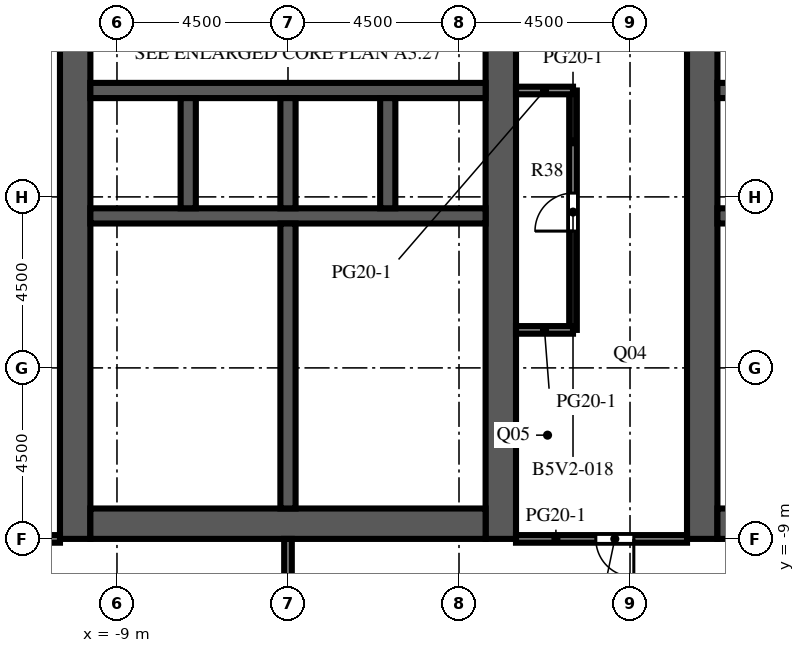
"""IFC4 building model, lengths in metres.
Left out: names, types, materials, properties, quantities, classifications, styles, units other than length and angle.
Written with IfcOpenShell. Run it as: python <this file> out.ifc"""

import sys

from ifc_helpers import new_model, si_unit, direction, frame, frame_2d, origin, place, context, subcontext, project, spatial, rectangle, extrude, element, fill, save


model = new_model("IFC4")
c1 = context("Model", 3, precision=1e-05, world=origin(), true_north=direction((0.0, 1.0)))
c2 = subcontext(c1, "Body", "Model", "MODEL_VIEW")
j1 = project(units=[si_unit("LENGTHUNIT", "METRE"), si_unit("PLANEANGLEUNIT", "RADIAN")], contexts=[c1])
p1 = place(None, origin())
s1 = spatial("IfcSite", under=j1, at=p1, CompositionType="ELEMENT")
p2 = place(p1, origin())
s2 = spatial("IfcBuilding", under=s1, at=p2, CompositionType="ELEMENT")
p3 = place(p2, frame((0.0, 0.0, 177.3)))
s3 = spatial("IfcBuildingStorey", under=s2, at=p3, CompositionType="ELEMENT", Elevation=177.3)
p4 = place(p3, frame((-10.1, -9.0, 0.0), z_axis=(0.0, 0.0, 1.0), x_axis=(0.0, 1.0, 0.0)))
e1 = element("IfcWall", 1, at=p4, inside=s3, PredefinedType="SHEAR", context=c2, shape_type="SweptSolid", body=[
    extrude(rectangle(XDim=27.5, YDim=0.8, at=frame_2d((13.75, 0.0))), origin(), (0.0, 0.0, 1.0), 4.1),
])
p5 = place(p4, frame((12.55, 0.0, 0.0)))
e2 = element("IfcOpeningElement", 2, at=p5, cuts=e1, PredefinedType="OPENING", context=c2, shape_type="SweptSolid", body=[
    extrude(rectangle(XDim=2.4, YDim=2.4, at=frame_2d((1.2, 1.2))), frame((0.0, 0.41, 0.0), z_axis=(0.0, -1.0, 0.0), x_axis=(1.0, 0.0, 0.0)), (0.0, 0.0, 1.0), 0.82),
])
p6 = place(p4, frame((6.825, 0.0, 0.0)))
e3 = element("IfcOpeningElement", 3, at=p6, cuts=e1, PredefinedType="OPENING", context=c2, shape_type="SweptSolid", body=[
    extrude(rectangle(XDim=1.2, YDim=2.1, at=frame_2d((0.6, 1.05))), frame((0.0, 0.41, 0.0), z_axis=(0.0, -1.0, 0.0), x_axis=(1.0, 0.0, 0.0)), (0.0, 0.0, 1.0), 0.82),
])
p7 = place(p4, frame((19.475, 0.0, 0.0)))
e4 = element("IfcOpeningElement", 4, at=p7, cuts=e1, PredefinedType="OPENING", context=c2, shape_type="SweptSolid", body=[
    extrude(rectangle(XDim=1.2, YDim=2.1, at=frame_2d((0.6, 1.05))), frame((0.0, 0.41, 0.0), z_axis=(0.0, -1.0, 0.0), x_axis=(1.0, 0.0, 0.0)), (0.0, 0.0, 1.0), 0.82),
])
p8 = place(p3, frame((1.1, -9.0, 0.0), z_axis=(0.0, 0.0, 1.0), x_axis=(0.0, 1.0, 0.0)))
e5 = element("IfcWall", 5, at=p8, inside=s3, PredefinedType="SHEAR", context=c2, shape_type="SweptSolid", body=[
    extrude(rectangle(XDim=27.5, YDim=0.8, at=frame_2d((13.75, 0.0))), origin(), (0.0, 0.0, 1.0), 4.1),
])
p9 = place(p8, frame((12.55, 0.0, 0.0)))
e6 = element("IfcOpeningElement", 6, at=p9, cuts=e5, PredefinedType="OPENING", context=c2, shape_type="SweptSolid", body=[
    extrude(rectangle(XDim=2.4, YDim=2.4, at=frame_2d((1.2, 1.2))), frame((0.0, 0.41, 0.0), z_axis=(0.0, -1.0, 0.0), x_axis=(1.0, 0.0, 0.0)), (0.0, 0.0, 1.0), 0.82),
])
p10 = place(p8, frame((3.85, 0.0, 0.0)))
e7 = element("IfcOpeningElement", 7, at=p10, cuts=e5, PredefinedType="OPENING", context=c2, shape_type="SweptSolid", body=[
    extrude(rectangle(XDim=0.95, YDim=2.1, at=frame_2d((0.475, 1.05))), frame((0.0, 0.41, 0.0), z_axis=(0.0, -1.0, 0.0), x_axis=(1.0, 0.0, 0.0)), (0.0, 0.0, 1.0), 0.82),
])
p11 = place(p8, frame((23.475, 0.0, 0.0)))
e8 = element("IfcOpeningElement", 8, at=p11, cuts=e5, PredefinedType="OPENING", context=c2, shape_type="SweptSolid", body=[
    extrude(rectangle(XDim=1.2, YDim=2.1, at=frame_2d((0.6, 1.05))), frame((0.0, 0.41, 0.0), z_axis=(0.0, -1.0, 0.0), x_axis=(1.0, 0.0, 0.0)), (0.0, 0.0, 1.0), 0.82),
])
p12 = place(p3, frame((-9.7, -8.6, 0.0), z_axis=(0.0, 0.0, 1.0), x_axis=(1.0, 0.0, 0.0)))
e9 = element("IfcWall", 9, at=p12, inside=s3, PredefinedType="SHEAR", context=c2, shape_type="SweptSolid", body=[
    extrude(rectangle(XDim=10.4, YDim=0.8, at=frame_2d((5.2, 0.0))), origin(), (0.0, 0.0, 1.0), 4.1),
])
p13 = place(p3, frame((-9.7, -0.5, 0.0), z_axis=(0.0, 0.0, 1.0), x_axis=(1.0, 0.0, 0.0)))
e10 = element("IfcWall", 10, at=p13, inside=s3, PredefinedType="SHEAR", context=c2, shape_type="SweptSolid", body=[
    extrude(rectangle(XDim=10.4, YDim=0.4, at=frame_2d((5.2, 0.0))), origin(), (0.0, 0.0, 1.0), 4.1),
])
p14 = place(p3, frame((-9.7, 2.8, 0.0), z_axis=(0.0, 0.0, 1.0), x_axis=(1.0, 0.0, 0.0)))
e11 = element("IfcWall", 11, at=p14, inside=s3, PredefinedType="SHEAR", context=c2, shape_type="SweptSolid", body=[
    extrude(rectangle(XDim=10.4, YDim=0.4, at=frame_2d((5.2, 0.0))), origin(), (0.0, 0.0, 1.0), 4.1),
])
p15 = place(p14, frame((0.738, 0.0, 0.0)))
e12 = element("IfcOpeningElement", 12, at=p15, cuts=e11, PredefinedType="OPENING", context=c2, shape_type="SweptSolid", body=[
    extrude(rectangle(XDim=1.1, YDim=2.1, at=frame_2d((0.55, 1.05))), frame((0.0, 0.21, 0.0), z_axis=(0.0, -1.0, 0.0), x_axis=(1.0, 0.0, 0.0)), (0.0, 0.0, 1.0), 0.42),
])
p16 = place(p14, frame((3.337, 0.0, 0.0)))
e13 = element("IfcOpeningElement", 13, at=p16, cuts=e11, PredefinedType="OPENING", context=c2, shape_type="SweptSolid", body=[
    extrude(rectangle(XDim=1.1, YDim=2.1, at=frame_2d((0.55, 1.05))), frame((0.0, 0.21, 0.0), z_axis=(0.0, -1.0, 0.0), x_axis=(1.0, 0.0, 0.0)), (0.0, 0.0, 1.0), 0.42),
])
p17 = place(p14, frame((6.012, 0.0, 0.0)))
e14 = element("IfcOpeningElement", 14, at=p17, cuts=e11, PredefinedType="OPENING", context=c2, shape_type="SweptSolid", body=[
    extrude(rectangle(XDim=1.0, YDim=2.1, at=frame_2d((0.5, 1.05))), frame((0.0, 0.21, 0.0), z_axis=(0.0, -1.0, 0.0), x_axis=(1.0, 0.0, 0.0)), (0.0, 0.0, 1.0), 0.42),
])
p18 = place(p14, frame((8.613, 0.0, 0.0)))
e15 = element("IfcOpeningElement", 15, at=p18, cuts=e11, PredefinedType="OPENING", context=c2, shape_type="SweptSolid", body=[
    extrude(rectangle(XDim=1.0, YDim=2.1, at=frame_2d((0.5, 1.05))), frame((0.0, 0.21, 0.0), z_axis=(0.0, -1.0, 0.0), x_axis=(1.0, 0.0, 0.0)), (0.0, 0.0, 1.0), 0.42),
])
for number, where, z_axis, x_axis in (
    (16, (-7.125, -0.3, 0.0), (0.0, 0.0, 1.0), (0.0, 1.0, 0.0)),
    (17, (-4.5, -0.3, 0.0), (0.0, 0.0, 1.0), (0.0, 1.0, 0.0)),
    (18, (-1.875, -0.3, 0.0), (0.0, 0.0, 1.0), (0.0, 1.0, 0.0)),
):
    element("IfcWall", number, at=place(p3, frame(where, z_axis=z_axis, x_axis=x_axis)), inside=s3, PredefinedType="SHEAR", context=c2, shape_type="SweptSolid", body=[
        extrude(rectangle(XDim=2.9, YDim=0.4, at=frame_2d((1.45, 0.0))), origin(), (0.0, 0.0, 1.0), 4.1),
    ])
p19 = place(p3, frame((-4.5, -8.2, 0.0), z_axis=(0.0, 0.0, 1.0), x_axis=(0.0, 1.0, 0.0)))
e19 = element("IfcWall", 19, at=p19, inside=s3, PredefinedType="SHEAR", context=c2, shape_type="SweptSolid", body=[
    extrude(rectangle(XDim=7.5, YDim=0.4, at=frame_2d((3.75, 0.0))), origin(), (0.0, 0.0, 1.0), 4.1),
])
p20 = place(p3, frame((6.4, -9.0, 0.0), z_axis=(0.0, 0.0, 1.0), x_axis=(0.0, 1.0, 0.0)))
e20 = element("IfcWall", 20, at=p20, inside=s3, PredefinedType="SHEAR", context=c2, shape_type="SweptSolid", body=[
    extrude(rectangle(XDim=27.5, YDim=0.8, at=frame_2d((13.75, 0.0))), origin(), (0.0, 0.0, 1.0), 4.1),
])
p21 = place(p20, frame((12.55, 0.0, 0.0)))
e21 = element("IfcOpeningElement", 21, at=p21, cuts=e20, PredefinedType="OPENING", context=c2, shape_type="SweptSolid", body=[
    extrude(rectangle(XDim=2.4, YDim=2.4, at=frame_2d((1.2, 1.2))), frame((0.0, 0.41, 0.0), z_axis=(0.0, -1.0, 0.0), x_axis=(1.0, 0.0, 0.0)), (0.0, 0.0, 1.0), 0.82),
])
p22 = place(p20, frame((3.85, 0.0, 0.0)))
e22 = element("IfcOpeningElement", 22, at=p22, cuts=e20, PredefinedType="OPENING", context=c2, shape_type="SweptSolid", body=[
    extrude(rectangle(XDim=0.95, YDim=2.1, at=frame_2d((0.475, 1.05))), frame((0.0, 0.41, 0.0), z_axis=(0.0, -1.0, 0.0), x_axis=(1.0, 0.0, 0.0)), (0.0, 0.0, 1.0), 0.82),
])
p23 = place(p20, frame((23.475, 0.0, 0.0)))
e23 = element("IfcOpeningElement", 23, at=p23, cuts=e20, PredefinedType="OPENING", context=c2, shape_type="SweptSolid", body=[
    extrude(rectangle(XDim=1.2, YDim=2.1, at=frame_2d((0.6, 1.05))), frame((0.0, 0.41, 0.0), z_axis=(0.0, -1.0, 0.0), x_axis=(1.0, 0.0, 0.0)), (0.0, 0.0, 1.0), 0.82),
])
p24 = place(p3, frame((6.8, -8.6, 0.0), z_axis=(0.0, 0.0, 1.0), x_axis=(1.0, 0.0, 0.0)))
e24 = element("IfcWall", 24, at=p24, inside=s3, PredefinedType="SHEAR", context=c2, shape_type="SweptSolid", body=[
    extrude(rectangle(XDim=10.4, YDim=0.8, at=frame_2d((5.2, 0.0))), origin(), (0.0, 0.0, 1.0), 4.1),
])
p25 = place(p3, frame((6.8, -0.5, 0.0), z_axis=(0.0, 0.0, 1.0), x_axis=(1.0, 0.0, 0.0)))
e25 = element("IfcWall", 25, at=p25, inside=s3, PredefinedType="SHEAR", context=c2, shape_type="SweptSolid", body=[
    extrude(rectangle(XDim=10.4, YDim=0.4, at=frame_2d((5.2, 0.0))), origin(), (0.0, 0.0, 1.0), 4.1),
])
p26 = place(p3, frame((6.8, 2.8, 0.0), z_axis=(0.0, 0.0, 1.0), x_axis=(1.0, 0.0, 0.0)))
e26 = element("IfcWall", 26, at=p26, inside=s3, PredefinedType="SHEAR", context=c2, shape_type="SweptSolid", body=[
    extrude(rectangle(XDim=10.4, YDim=0.4, at=frame_2d((5.2, 0.0))), origin(), (0.0, 0.0, 1.0), 4.1),
])
p27 = place(p26, frame((0.738, 0.0, 0.0)))
e27 = element("IfcOpeningElement", 27, at=p27, cuts=e26, PredefinedType="OPENING", context=c2, shape_type="SweptSolid", body=[
    extrude(rectangle(XDim=1.1, YDim=2.1, at=frame_2d((0.55, 1.05))), frame((0.0, 0.21, 0.0), z_axis=(0.0, -1.0, 0.0), x_axis=(1.0, 0.0, 0.0)), (0.0, 0.0, 1.0), 0.42),
])
p28 = place(p26, frame((3.337, 0.0, 0.0)))
e28 = element("IfcOpeningElement", 28, at=p28, cuts=e26, PredefinedType="OPENING", context=c2, shape_type="SweptSolid", body=[
    extrude(rectangle(XDim=1.1, YDim=2.1, at=frame_2d((0.55, 1.05))), frame((0.0, 0.21, 0.0), z_axis=(0.0, -1.0, 0.0), x_axis=(1.0, 0.0, 0.0)), (0.0, 0.0, 1.0), 0.42),
])
p29 = place(p26, frame((6.012, 0.0, 0.0)))
e29 = element("IfcOpeningElement", 29, at=p29, cuts=e26, PredefinedType="OPENING", context=c2, shape_type="SweptSolid", body=[
    extrude(rectangle(XDim=1.0, YDim=2.1, at=frame_2d((0.5, 1.05))), frame((0.0, 0.21, 0.0), z_axis=(0.0, -1.0, 0.0), x_axis=(1.0, 0.0, 0.0)), (0.0, 0.0, 1.0), 0.42),
])
p30 = place(p26, frame((8.613, 0.0, 0.0)))
e30 = element("IfcOpeningElement", 30, at=p30, cuts=e26, PredefinedType="OPENING", context=c2, shape_type="SweptSolid", body=[
    extrude(rectangle(XDim=1.0, YDim=2.1, at=frame_2d((0.5, 1.05))), frame((0.0, 0.21, 0.0), z_axis=(0.0, -1.0, 0.0), x_axis=(1.0, 0.0, 0.0)), (0.0, 0.0, 1.0), 0.42),
])
p31 = place(p3, frame((-4.3, -5.35, 0.0), z_axis=(0.0, 0.0, 1.0), x_axis=(1.0, 0.0, 0.0)))
e31 = element("IfcWall", 31, at=p31, inside=s3, PredefinedType="PARTITIONING", context=c2, shape_type="SweptSolid", body=[
    extrude(rectangle(XDim=5.0, YDim=0.1, at=frame_2d((2.5, 0.0))), origin(), (0.0, 0.0, 1.0), 3.65),
])
p32 = place(p31, frame((2.0, 0.0, 0.0)))
e32 = element("IfcOpeningElement", 32, at=p32, cuts=e31, PredefinedType="OPENING", context=c2, shape_type="SweptSolid", body=[
    extrude(rectangle(XDim=1.0, YDim=2.1, at=frame_2d((0.5, 1.05))), frame((0.0, 0.06, 0.0), z_axis=(0.0, -1.0, 0.0), x_axis=(1.0, 0.0, 0.0)), (0.0, 0.0, 1.0), 0.12),
])
p33 = place(p3, frame((-2.4, -4.0, 0.0), z_axis=(0.0, 0.0, 1.0), x_axis=(1.0, 0.0, 0.0)))
e33 = element("IfcWall", 33, at=p33, inside=s3, PredefinedType="PARTITIONING", context=c2, shape_type="SweptSolid", body=[
    extrude(rectangle(XDim=3.1, YDim=0.1, at=frame_2d((1.55, 0.0))), origin(), (0.0, 0.0, 1.0), 3.65),
])
p34 = place(p33, frame((1.05, 0.0, 0.0)))
e34 = element("IfcOpeningElement", 34, at=p34, cuts=e33, PredefinedType="OPENING", context=c2, shape_type="SweptSolid", body=[
    extrude(rectangle(XDim=1.0, YDim=2.1, at=frame_2d((0.5, 1.05))), frame((0.0, 0.06, 0.0), z_axis=(0.0, -1.0, 0.0), x_axis=(1.0, 0.0, 0.0)), (0.0, 0.0, 1.0), 0.12),
])
p35 = place(p3, frame((-4.3, -4.0, 0.0), z_axis=(0.0, 0.0, 1.0), x_axis=(1.0, 0.0, 0.0)))
e35 = element("IfcWall", 35, at=p35, inside=s3, PredefinedType="PARTITIONING", context=c2, shape_type="SweptSolid", body=[
    extrude(rectangle(XDim=1.9, YDim=0.1, at=frame_2d((0.95, 0.0))), origin(), (0.0, 0.0, 1.0), 3.65),
])
p36 = place(p35, frame((0.45, 0.0, 0.0)))
e36 = element("IfcOpeningElement", 36, at=p36, cuts=e35, PredefinedType="OPENING", context=c2, shape_type="SweptSolid", body=[
    extrude(rectangle(XDim=1.0, YDim=2.1, at=frame_2d((0.5, 1.05))), frame((0.0, 0.06, 0.0), z_axis=(0.0, -1.0, 0.0), x_axis=(1.0, 0.0, 0.0)), (0.0, 0.0, 1.0), 0.12),
])
p37 = place(p3, frame((-2.4, -4.0, 0.0), z_axis=(0.0, 0.0, 1.0), x_axis=(0.0, 1.0, 0.0)))
e37 = element("IfcWall", 37, at=p37, inside=s3, PredefinedType="PARTITIONING", context=c2, shape_type="SweptSolid", body=[
    extrude(rectangle(XDim=3.3, YDim=0.1, at=frame_2d((1.65, 0.0))), origin(), (0.0, 0.0, 1.0), 3.65),
])
p38 = place(p3, frame((6.8, -5.35, 0.0), z_axis=(0.0, 0.0, 1.0), x_axis=(1.0, 0.0, 0.0)))
e38 = element("IfcWall", 38, at=p38, inside=s3, PredefinedType="PARTITIONING", context=c2, shape_type="SweptSolid", body=[
    extrude(rectangle(XDim=5.0, YDim=0.1, at=frame_2d((2.5, 0.0))), origin(), (0.0, 0.0, 1.0), 3.65),
])
p39 = place(p38, frame((2.0, 0.0, 0.0)))
e39 = element("IfcOpeningElement", 39, at=p39, cuts=e38, PredefinedType="OPENING", context=c2, shape_type="SweptSolid", body=[
    extrude(rectangle(XDim=1.0, YDim=2.1, at=frame_2d((0.5, 1.05))), frame((0.0, 0.06, 0.0), z_axis=(0.0, -1.0, 0.0), x_axis=(1.0, 0.0, 0.0)), (0.0, 0.0, 1.0), 0.12),
])
p40 = place(p3, frame((6.8, -4.0, 0.0), z_axis=(0.0, 0.0, 1.0), x_axis=(1.0, 0.0, 0.0)))
e40 = element("IfcWall", 40, at=p40, inside=s3, PredefinedType="PARTITIONING", context=c2, shape_type="SweptSolid", body=[
    extrude(rectangle(XDim=3.1, YDim=0.1, at=frame_2d((1.55, 0.0))), origin(), (0.0, 0.0, 1.0), 3.65),
])
p41 = place(p40, frame((1.05, 0.0, 0.0)))
e41 = element("IfcOpeningElement", 41, at=p41, cuts=e40, PredefinedType="OPENING", context=c2, shape_type="SweptSolid", body=[
    extrude(rectangle(XDim=1.0, YDim=2.1, at=frame_2d((0.5, 1.05))), frame((0.0, 0.06, 0.0), z_axis=(0.0, -1.0, 0.0), x_axis=(1.0, 0.0, 0.0)), (0.0, 0.0, 1.0), 0.12),
])
p42 = place(p3, frame((-4.5, -26.5, 0.0), z_axis=(0.0, 0.0, 1.0), x_axis=(0.0, 1.0, 0.0)))
e42 = element("IfcWall", 42, at=p42, inside=s3, PredefinedType="PARTITIONING", context=c2, shape_type="SweptSolid", body=[
    extrude(rectangle(XDim=17.5, YDim=0.2, at=frame_2d((8.75, 0.0))), origin(), (0.0, 0.0, 1.0), 3.65),
])
p43 = place(p3, frame((3.0, -3.5, 0.0), z_axis=(0.0, 0.0, 1.0), x_axis=(0.0, 1.0, 0.0)))
e43 = element("IfcWall", 43, at=p43, inside=s3, PredefinedType="PARTITIONING", context=c2, shape_type="SweptSolid", body=[
    extrude(rectangle(XDim=6.3, YDim=0.2, at=frame_2d((3.15, 0.0))), origin(), (0.0, 0.0, 1.0), 3.65),
])
p44 = place(p43, frame((2.6, 0.0, 0.0)))
e44 = element("IfcOpeningElement", 44, at=p44, cuts=e43, PredefinedType="OPENING", context=c2, shape_type="SweptSolid", body=[
    extrude(rectangle(XDim=1.0, YDim=2.1, at=frame_2d((0.5, 1.05))), frame((0.0, 0.11, 0.0), z_axis=(0.0, -1.0, 0.0), x_axis=(1.0, 0.0, 0.0)), (0.0, 0.0, 1.0), 0.22),
])
p45 = place(p3, frame((-10.5, -9.0, 0.0), z_axis=(0.0, 0.0, 1.0), x_axis=(-1.0, 0.0, 0.0)))
e45 = element("IfcWall", 45, at=p45, inside=s3, PredefinedType="PARTITIONING", context=c2, shape_type="SweptSolid", body=[
    extrude(rectangle(XDim=3.0, YDim=0.2, at=frame_2d((1.5, 0.0))), origin(), (0.0, 0.0, 1.0), 3.65),
])
p46 = place(p45, frame((0.65, 0.0, 0.0)))
e46 = element("IfcOpeningElement", 46, at=p46, cuts=e45, PredefinedType="OPENING", context=c2, shape_type="SweptSolid", body=[
    extrude(rectangle(XDim=1.0, YDim=2.1, at=frame_2d((0.5, 1.05))), frame((0.0, 0.11, 0.0), z_axis=(0.0, -1.0, 0.0), x_axis=(1.0, 0.0, 0.0)), (0.0, 0.0, 1.0), 0.22),
])
p47 = place(p3, frame((6.0, -9.0, 0.0), z_axis=(0.0, 0.0, 1.0), x_axis=(-1.0, 0.0, 0.0)))
e47 = element("IfcWall", 47, at=p47, inside=s3, PredefinedType="PARTITIONING", context=c2, shape_type="SweptSolid", body=[
    extrude(rectangle(XDim=4.5, YDim=0.2, at=frame_2d((2.25, 0.0))), origin(), (0.0, 0.0, 1.0), 3.65),
])
p48 = place(p47, frame((1.4, 0.0, 0.0)))
e48 = element("IfcOpeningElement", 48, at=p48, cuts=e47, PredefinedType="OPENING", context=c2, shape_type="SweptSolid", body=[
    extrude(rectangle(XDim=1.0, YDim=2.1, at=frame_2d((0.5, 1.05))), frame((0.0, 0.11, 0.0), z_axis=(0.0, -1.0, 0.0), x_axis=(1.0, 0.0, 0.0)), (0.0, 0.0, 1.0), 0.22),
])
for number, where, z_axis, x_axis in (
    (49, (1.5, -3.5, 0.0), (0.0, 0.0, 1.0), (1.0, 0.0, 0.0)),
    (50, (1.5, 2.8, 0.0), (0.0, 0.0, 1.0), (1.0, 0.0, 0.0)),
):
    element("IfcWall", number, at=place(p3, frame(where, z_axis=z_axis, x_axis=x_axis)), inside=s3, PredefinedType="PARTITIONING", context=c2, shape_type="SweptSolid", body=[
        extrude(rectangle(XDim=1.5, YDim=0.2, at=frame_2d((0.75, 0.0))), origin(), (0.0, 0.0, 1.0), 3.65),
    ])
p49 = place(p15, origin())
e51 = element("IfcDoor", 51, at=p49, inside=s3, OperationType="DOUBLE_DOOR_SLIDING", PredefinedType="DOOR", context=c2, shape_type="SweptSolid", body=[
    extrude(rectangle(XDim=1.1, YDim=2.1, at=frame_2d((0.55, 1.05))), frame((0.0, 0.025, 0.0), z_axis=(0.0, -1.0, 0.0), x_axis=(1.0, 0.0, 0.0)), (0.0, 0.0, 1.0), 0.05),
])
fill(e12, e51)
p50 = place(p16, origin())
e52 = element("IfcDoor", 52, at=p50, inside=s3, OperationType="DOUBLE_DOOR_SLIDING", PredefinedType="DOOR", context=c2, shape_type="SweptSolid", body=[
    extrude(rectangle(XDim=1.1, YDim=2.1, at=frame_2d((0.55, 1.05))), frame((0.0, 0.025, 0.0), z_axis=(0.0, -1.0, 0.0), x_axis=(1.0, 0.0, 0.0)), (0.0, 0.0, 1.0), 0.05),
])
fill(e13, e52)
p51 = place(p5, origin())
e53 = element("IfcDoor", 53, at=p51, inside=s3, OperationType="DOUBLE_DOOR_DOUBLE_SWING", PredefinedType="DOOR", context=c2, shape_type="SweptSolid", body=[
    extrude(rectangle(XDim=2.4, YDim=2.4, at=frame_2d((1.2, 1.2))), frame((0.0, 0.025, 0.0), z_axis=(0.0, -1.0, 0.0), x_axis=(1.0, 0.0, 0.0)), (0.0, 0.0, 1.0), 0.05),
])
fill(e2, e53)
p52 = place(p9, origin())
e54 = element("IfcDoor", 54, at=p52, inside=s3, OperationType="DOUBLE_DOOR_DOUBLE_SWING", PredefinedType="DOOR", context=c2, shape_type="SweptSolid", body=[
    extrude(rectangle(XDim=2.4, YDim=2.4, at=frame_2d((1.2, 1.2))), frame((0.0, 0.025, 0.0), z_axis=(0.0, -1.0, 0.0), x_axis=(1.0, 0.0, 0.0)), (0.0, 0.0, 1.0), 0.05),
])
fill(e6, e54)
p53 = place(p21, origin())
e55 = element("IfcDoor", 55, at=p53, inside=s3, OperationType="DOUBLE_DOOR_DOUBLE_SWING", PredefinedType="DOOR", context=c2, shape_type="SweptSolid", body=[
    extrude(rectangle(XDim=2.4, YDim=2.4, at=frame_2d((1.2, 1.2))), frame((0.0, 0.025, 0.0), z_axis=(0.0, -1.0, 0.0), x_axis=(1.0, 0.0, 0.0)), (0.0, 0.0, 1.0), 0.05),
])
fill(e21, e55)
p54 = place(p6, origin())
e56 = element("IfcDoor", 56, at=p54, inside=s3, OperationType="SINGLE_SWING_LEFT", PredefinedType="DOOR", context=c2, shape_type="SweptSolid", body=[
    extrude(rectangle(XDim=1.2, YDim=2.1, at=frame_2d((0.6, 1.05))), frame((0.0, 0.025, 0.0), z_axis=(0.0, -1.0, 0.0), x_axis=(1.0, 0.0, 0.0)), (0.0, 0.0, 1.0), 0.05),
])
fill(e3, e56)
p55 = place(p17, origin())
e57 = element("IfcDoor", 57, at=p55, inside=s3, OperationType="SINGLE_SWING_LEFT", PredefinedType="DOOR", context=c2, shape_type="SweptSolid", body=[
    extrude(rectangle(XDim=1.0, YDim=2.1, at=frame_2d((0.5, 1.05))), frame((0.0, 0.025, 0.0), z_axis=(0.0, -1.0, 0.0), x_axis=(1.0, 0.0, 0.0)), (0.0, 0.0, 1.0), 0.05),
])
fill(e14, e57)
p56 = place(p18, origin())
e58 = element("IfcDoor", 58, at=p56, inside=s3, OperationType="SINGLE_SWING_RIGHT", PredefinedType="DOOR", context=c2, shape_type="SweptSolid", body=[
    extrude(rectangle(XDim=1.0, YDim=2.1, at=frame_2d((0.5, 1.05))), frame((0.0, 0.025, 0.0), z_axis=(0.0, -1.0, 0.0), x_axis=(1.0, 0.0, 0.0)), (0.0, 0.0, 1.0), 0.05),
])
fill(e15, e58)
p57 = place(p10, origin())
e59 = element("IfcDoor", 59, at=p57, inside=s3, OperationType="SINGLE_SWING_LEFT", PredefinedType="DOOR", context=c2, shape_type="SweptSolid", body=[
    extrude(rectangle(XDim=0.95, YDim=2.1, at=frame_2d((0.475, 1.05))), frame((0.0, 0.375, 0.0), z_axis=(0.0, -1.0, 0.0), x_axis=(1.0, 0.0, 0.0)), (0.0, 0.0, 1.0), 0.05),
])
fill(e7, e59)
p58 = place(p32, origin())
e60 = element("IfcDoor", 60, at=p58, inside=s3, OperationType="SINGLE_SWING_RIGHT", PredefinedType="DOOR", context=c2, shape_type="SweptSolid", body=[
    extrude(rectangle(XDim=1.0, YDim=2.1, at=frame_2d((0.5, 1.05))), frame((0.0, 0.025, 0.0), z_axis=(0.0, -1.0, 0.0), x_axis=(1.0, 0.0, 0.0)), (0.0, 0.0, 1.0), 0.05),
])
fill(e32, e60)
p59 = place(p34, origin())
e61 = element("IfcDoor", 61, at=p59, inside=s3, OperationType="SINGLE_SWING_LEFT", PredefinedType="DOOR", context=c2, shape_type="SweptSolid", body=[
    extrude(rectangle(XDim=1.0, YDim=2.1, at=frame_2d((0.5, 1.05))), frame((0.0, 0.025, 0.0), z_axis=(0.0, -1.0, 0.0), x_axis=(1.0, 0.0, 0.0)), (0.0, 0.0, 1.0), 0.05),
])
fill(e34, e61)
p60 = place(p36, origin())
e62 = element("IfcDoor", 62, at=p60, inside=s3, OperationType="SINGLE_SWING_RIGHT", PredefinedType="DOOR", context=c2, shape_type="SweptSolid", body=[
    extrude(rectangle(XDim=1.0, YDim=2.1, at=frame_2d((0.5, 1.05))), frame((0.0, 0.025, 0.0), z_axis=(0.0, -1.0, 0.0), x_axis=(1.0, 0.0, 0.0)), (0.0, 0.0, 1.0), 0.05),
])
fill(e36, e62)
p61 = place(p22, origin())
e63 = element("IfcDoor", 63, at=p61, inside=s3, OperationType="SINGLE_SWING_RIGHT", PredefinedType="DOOR", context=c2, shape_type="SweptSolid", body=[
    extrude(rectangle(XDim=0.95, YDim=2.1, at=frame_2d((0.475, 1.05))), frame((0.0, -0.325, 0.0), z_axis=(0.0, -1.0, 0.0), x_axis=(1.0, 0.0, 0.0)), (0.0, 0.0, 1.0), 0.05),
])
fill(e22, e63)
p62 = place(p48, origin())
e64 = element("IfcDoor", 64, at=p62, inside=s3, OperationType="SINGLE_SWING_LEFT", PredefinedType="DOOR", context=c2, shape_type="SweptSolid", body=[
    extrude(rectangle(XDim=1.0, YDim=2.1, at=frame_2d((0.5, 1.05))), frame((0.0, 0.025, 0.0), z_axis=(0.0, -1.0, 0.0), x_axis=(1.0, 0.0, 0.0)), (0.0, 0.0, 1.0), 0.05),
])
fill(e48, e64)
p63 = place(p44, origin())
e65 = element("IfcDoor", 65, at=p63, inside=s3, OperationType="SINGLE_SWING_LEFT", PredefinedType="DOOR", context=c2, shape_type="SweptSolid", body=[
    extrude(rectangle(XDim=1.0, YDim=2.1, at=frame_2d((0.5, 1.05))), frame((0.0, 0.025, 0.0), z_axis=(0.0, -1.0, 0.0), x_axis=(1.0, 0.0, 0.0)), (0.0, 0.0, 1.0), 0.05),
])
fill(e44, e65)
save(model, sys.argv[1])
